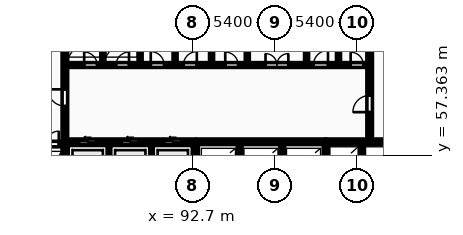
"""IFC4 building model, lengths in metres.
Left out: names, types, materials, properties, quantities, classifications, styles, units other than length and angle.
Written with IfcOpenShell. Run it as: python <this file> out.ifc"""

import sys

from ifc_helpers import new_model, si_unit, direction, frame, frame_2d, origin, place, context, subcontext, project, spatial, rectangle, extrude, element, fill, save


model = new_model("IFC4")
c1 = context("Model", 3, precision=1e-05, world=origin(), true_north=direction((0.0, 1.0)))
c2 = subcontext(c1, "Body", "Model", "MODEL_VIEW")
j1 = project(units=[si_unit("LENGTHUNIT", "METRE"), si_unit("PLANEANGLEUNIT", "RADIAN")], contexts=[c1])
p1 = place(None, origin())
s1 = spatial("IfcSite", under=j1, at=p1, CompositionType="ELEMENT")
p2 = place(p1, origin())
s2 = spatial("IfcBuilding", under=s1, at=p2, CompositionType="ELEMENT")
p3 = place(p2, frame((0.0, 0.0, -7.2)))
s3 = spatial("IfcBuildingStorey", under=s2, at=p3, CompositionType="ELEMENT", Elevation=-7.2)
p4 = place(p3, frame((79.79, 58.1, 0.0), z_axis=(0.0, 0.0, 1.0), x_axis=(1.0, 0.0, 0.0)))
e1 = element("IfcWall", 1, at=p4, inside=s3, PredefinedType="SHEAR", context=c2, shape_type="SweptSolid", body=[
    extrude(rectangle(XDim=4.39, YDim=0.25, at=frame_2d((2.195, 0.0))), origin(), (0.0, 0.0, 1.0), 3.6),
])
p5 = place(p4, frame((1.05, 0.0, 0.0)))
e2 = element("IfcOpeningElement", 2, at=p5, cuts=e1, PredefinedType="OPENING", context=c2, shape_type="SweptSolid", body=[
    extrude(rectangle(XDim=1.12, YDim=2.12, at=frame_2d((0.56, 1.06))), frame((0.0, 0.135, 0.0), z_axis=(0.0, -1.0, 0.0), x_axis=(1.0, 0.0, 0.0)), (0.0, 0.0, 1.0), 0.27),
])
p6 = place(p4, frame((3.26, 0.0, 0.0)))
e3 = element("IfcOpeningElement", 3, at=p6, cuts=e1, PredefinedType="OPENING", context=c2, shape_type="SweptSolid", body=[
    extrude(rectangle(XDim=0.85, YDim=2.05, at=frame_2d((0.425, 1.025))), frame((0.0, 0.135, 0.0), z_axis=(0.0, -1.0, 0.0), x_axis=(1.0, 0.0, 0.0)), (0.0, 0.0, 1.0), 0.27),
])
p7 = place(p3, frame((84.3, 55.4, 0.0), z_axis=(0.0, 0.0, 1.0), x_axis=(0.0, 1.0, 0.0)))
e4 = element("IfcWall", 4, at=p7, inside=s3, PredefinedType="SHEAR", context=c2, shape_type="SweptSolid", body=[
    extrude(rectangle(XDim=11.6, YDim=0.25, at=frame_2d((5.8, 0.0))), origin(), (0.0, 0.0, 1.0), 3.6),
])
p8 = place(p7, frame((5.2, 0.0, 0.0)))
e5 = element("IfcOpeningElement", 5, at=p8, cuts=e4, PredefinedType="OPENING", context=c2, shape_type="SweptSolid", body=[
    extrude(rectangle(XDim=1.1, YDim=2.1, at=frame_2d((0.55, 1.05))), frame((0.0, 0.135, 0.0), z_axis=(0.0, -1.0, 0.0), x_axis=(1.0, 0.0, 0.0)), (0.0, 0.0, 1.0), 0.27),
])
for number, where, z_axis, x_axis in (
    (6, (87.2, 55.4, 0.0), (0.0, 0.0, 1.0), (0.0, 1.0, 0.0)),
    (7, (90.0, 55.4, 0.0), (0.0, 0.0, 1.0), (0.0, 1.0, 0.0)),
):
    element("IfcWall", number, at=place(p3, frame(where, z_axis=z_axis, x_axis=x_axis)), inside=s3, PredefinedType="PARTITIONING", context=c2, shape_type="SweptSolid", body=[
        extrude(rectangle(XDim=2.72, YDim=0.2, at=frame_2d((1.36, 0.0))), origin(), (0.0, 0.0, 1.0), 3.3),
    ])
p9 = place(p3, frame((84.42, 58.25, 0.0), z_axis=(0.0, 0.0, 1.0), x_axis=(1.0, 0.0, 0.0)))
e8 = element("IfcWall", 8, at=p9, inside=s3, PredefinedType="SHEAR", context=c2, shape_type="SweptSolid", body=[
    extrude(rectangle(XDim=8.36, YDim=0.25, at=frame_2d((4.18, 0.0))), origin(), (0.0, 0.0, 1.0), 3.6),
])
p10 = place(p9, frame((0.82, 0.0, 0.0)))
e9 = element("IfcOpeningElement", 9, at=p10, cuts=e8, PredefinedType="OPENING", context=c2, shape_type="SweptSolid", body=[
    extrude(rectangle(XDim=1.12, YDim=2.12, at=frame_2d((0.56, 1.06))), frame((0.0, 0.135, 0.0), z_axis=(0.0, -1.0, 0.0), x_axis=(1.0, 0.0, 0.0)), (0.0, 0.0, 1.0), 0.27),
])
p11 = place(p9, frame((3.62, 0.0, 0.0)))
e10 = element("IfcOpeningElement", 10, at=p11, cuts=e8, PredefinedType="OPENING", context=c2, shape_type="SweptSolid", body=[
    extrude(rectangle(XDim=1.12, YDim=2.12, at=frame_2d((0.56, 1.06))), frame((0.0, 0.135, 0.0), z_axis=(0.0, -1.0, 0.0), x_axis=(1.0, 0.0, 0.0)), (0.0, 0.0, 1.0), 0.27),
])
p12 = place(p9, frame((6.42, 0.0, 0.0)))
e11 = element("IfcOpeningElement", 11, at=p12, cuts=e8, PredefinedType="OPENING", context=c2, shape_type="SweptSolid", body=[
    extrude(rectangle(XDim=1.12, YDim=2.12, at=frame_2d((0.56, 1.06))), frame((0.0, 0.135, 0.0), z_axis=(0.0, -1.0, 0.0), x_axis=(1.0, 0.0, 0.0)), (0.0, 0.0, 1.0), 0.27),
])
p13 = place(p3, frame((92.9, 55.4, 0.0), z_axis=(0.0, 0.0, 1.0), x_axis=(0.0, 1.0, 0.0)))
e12 = element("IfcWall", 12, at=p13, inside=s3, PredefinedType="SHEAR", context=c2, shape_type="SweptSolid", body=[
    extrude(rectangle(XDim=2.85, YDim=0.25, at=frame_2d((1.425, 0.0))), origin(), (0.0, 0.0, 1.0), 3.6),
])
for number, where, z_axis, x_axis in (
    (13, (95.8, 55.4, 0.0), (0.0, 0.0, 1.0), (0.0, 1.0, 0.0)),
    (14, (98.6, 55.4, 0.0), (0.0, 0.0, 1.0), (0.0, 1.0, 0.0)),
):
    element("IfcWall", number, at=place(p3, frame(where, z_axis=z_axis, x_axis=x_axis)), inside=s3, PredefinedType="PARTITIONING", context=c2, shape_type="SweptSolid", body=[
        extrude(rectangle(XDim=2.72, YDim=0.2, at=frame_2d((1.36, 0.0))), origin(), (0.0, 0.0, 1.0), 3.3),
    ])
p14 = place(p3, frame((93.02, 58.25, 0.0), z_axis=(0.0, 0.0, 1.0), x_axis=(1.0, 0.0, 0.0)))
e15 = element("IfcWall", 15, at=p14, inside=s3, PredefinedType="SHEAR", context=c2, shape_type="SweptSolid", body=[
    extrude(rectangle(XDim=8.36, YDim=0.25, at=frame_2d((4.18, 0.0))), origin(), (0.0, 0.0, 1.0), 3.6),
])
p15 = place(p3, frame((101.48, 55.4, 0.0), z_axis=(0.0, 0.0, 1.0), x_axis=(0.0, 1.0, 0.0)))
e16 = element("IfcWall", 16, at=p15, inside=s3, PredefinedType="SHEAR", context=c2, shape_type="SweptSolid", body=[
    extrude(rectangle(XDim=2.85, YDim=0.25, at=frame_2d((1.425, 0.0))), origin(), (0.0, 0.0, 1.0), 3.6),
])
p16 = place(p3, frame((103.85, 55.4, 0.0), z_axis=(0.0, 0.0, 1.0), x_axis=(0.0, 1.0, 0.0)))
e17 = element("IfcWall", 17, at=p16, inside=s3, PredefinedType="PARTITIONING", context=c2, shape_type="SweptSolid", body=[
    extrude(rectangle(XDim=2.72, YDim=0.2, at=frame_2d((1.36, 0.0))), origin(), (0.0, 0.0, 1.0), 3.3),
])
p17 = place(p3, frame((101.55, 58.25, 0.0), z_axis=(0.0, 0.0, 1.0), x_axis=(1.0, 0.0, 0.0)))
e18 = element("IfcWall", 18, at=p17, inside=s3, PredefinedType="SHEAR", context=c2, shape_type="SweptSolid", body=[
    extrude(rectangle(XDim=4.6, YDim=0.25, at=frame_2d((2.3, 0.0))), origin(), (0.0, 0.0, 1.0), 3.6),
])
for number, where, z_axis, x_axis in (
    (19, (86.8, 63.4, 0.0), (0.0, 0.0, 1.0), (0.0, 1.0, 0.0)),
    (20, (89.25, 63.4, 0.0), (0.0, 0.0, 1.0), (0.0, 1.0, 0.0)),
    (21, (91.55, 63.4, 0.0), (0.0, 0.0, 1.0), (0.0, 1.0, 0.0)),
):
    element("IfcWall", number, at=place(p3, frame(where, z_axis=z_axis, x_axis=x_axis)), inside=s3, PredefinedType="PARTITIONING", context=c2, shape_type="SweptSolid", body=[
        extrude(rectangle(XDim=3.6, YDim=0.15, at=frame_2d((1.8, 0.0))), origin(), (0.0, 0.0, 1.0), 3.3),
    ])
p18 = place(p3, frame((93.95, 63.4, 0.0), z_axis=(0.0, 0.0, 1.0), x_axis=(0.0, 1.0, 0.0)))
e22 = element("IfcWall", 22, at=p18, inside=s3, PredefinedType="PARTITIONING", context=c2, shape_type="SweptSolid", body=[
    extrude(rectangle(XDim=3.6, YDim=0.15, at=frame_2d((1.8, 0.0))), origin(), (0.0, 0.0, 1.0), 2.55),
])
for number, where, z_axis, x_axis in (
    (23, (102.3, 63.4, 0.0), (0.0, 0.0, 1.0), (0.0, 1.0, 0.0)),
    (24, (96.3, 63.4, 0.0), (0.0, 0.0, 1.0), (0.0, 1.0, 0.0)),
    (25, (100.2, 63.4, 0.0), (0.0, 0.0, 1.0), (0.0, 1.0, 0.0)),
):
    element("IfcWall", number, at=place(p3, frame(where, z_axis=z_axis, x_axis=x_axis)), inside=s3, PredefinedType="PARTITIONING", context=c2, shape_type="SweptSolid", body=[
        extrude(rectangle(XDim=3.6, YDim=0.15, at=frame_2d((1.8, 0.0))), origin(), (0.0, 0.0, 1.0), 3.3),
    ])
p19 = place(p3, frame((84.42, 63.3, 0.0), z_axis=(0.0, 0.0, 1.0), x_axis=(1.0, 0.0, 0.0)))
e26 = element("IfcWall", 26, at=p19, inside=s3, PredefinedType="PARTITIONING", context=c2, shape_type="SweptSolid", body=[
    extrude(rectangle(XDim=19.83, YDim=0.2, at=frame_2d((9.915, 0.0))), origin(), (0.0, 0.0, 1.0), 3.3),
])
p20 = place(p19, frame((1.15, 0.0, 0.0)))
e27 = element("IfcOpeningElement", 27, at=p20, cuts=e26, PredefinedType="OPENING", context=c2, shape_type="SweptSolid", body=[
    extrude(rectangle(XDim=0.85, YDim=2.05, at=frame_2d((0.425, 1.025))), frame((0.0, 0.11, 0.0), z_axis=(0.0, -1.0, 0.0), x_axis=(1.0, 0.0, 0.0)), (0.0, 0.0, 1.0), 0.22),
])
p21 = place(p19, frame((3.25, 0.0, 0.0)))
e28 = element("IfcOpeningElement", 28, at=p21, cuts=e26, PredefinedType="OPENING", context=c2, shape_type="SweptSolid", body=[
    extrude(rectangle(XDim=0.85, YDim=2.05, at=frame_2d((0.425, 1.025))), frame((0.0, 0.11, 0.0), z_axis=(0.0, -1.0, 0.0), x_axis=(1.0, 0.0, 0.0)), (0.0, 0.0, 1.0), 0.22),
])
p22 = place(p19, frame((13.08, 0.0, 0.0)))
e29 = element("IfcOpeningElement", 29, at=p22, cuts=e26, PredefinedType="OPENING", context=c2, shape_type="SweptSolid", body=[
    extrude(rectangle(XDim=1.5, YDim=2.2, at=frame_2d((0.75, 1.1))), frame((0.0, 0.11, 0.0), z_axis=(0.0, -1.0, 0.0), x_axis=(1.0, 0.0, 0.0)), (0.0, 0.0, 1.0), 0.22),
])
p23 = place(p19, frame((5.53, 0.0, 0.0)))
e30 = element("IfcOpeningElement", 30, at=p23, cuts=e26, PredefinedType="OPENING", context=c2, shape_type="SweptSolid", body=[
    extrude(rectangle(XDim=0.88, YDim=2.06, at=frame_2d((0.44, 1.03))), frame((0.0, 0.11, 0.0), z_axis=(0.0, -1.0, 0.0), x_axis=(1.0, 0.0, 0.0)), (0.0, 0.0, 1.0), 0.22),
])
p24 = place(p19, frame((7.68, 0.0, 0.0)))
e31 = element("IfcOpeningElement", 31, at=p24, cuts=e26, PredefinedType="OPENING", context=c2, shape_type="SweptSolid", body=[
    extrude(rectangle(XDim=0.88, YDim=2.06, at=frame_2d((0.44, 1.03))), frame((0.0, 0.11, 0.0), z_axis=(0.0, -1.0, 0.0), x_axis=(1.0, 0.0, 0.0)), (0.0, 0.0, 1.0), 0.22),
])
p25 = place(p19, frame((10.43, 0.0, 0.0)))
e32 = element("IfcOpeningElement", 32, at=p25, cuts=e26, PredefinedType="OPENING", context=c2, shape_type="SweptSolid", body=[
    extrude(rectangle(XDim=0.85, YDim=2.05, at=frame_2d((0.425, 1.025))), frame((0.0, 0.11, 0.0), z_axis=(0.0, -1.0, 0.0), x_axis=(1.0, 0.0, 0.0)), (0.0, 0.0, 1.0), 0.22),
])
p26 = place(p19, frame((16.23, 0.0, 0.0)))
e33 = element("IfcOpeningElement", 33, at=p26, cuts=e26, PredefinedType="OPENING", context=c2, shape_type="SweptSolid", body=[
    extrude(rectangle(XDim=0.96, YDim=2.1, at=frame_2d((0.48, 1.05))), frame((0.0, 0.11, 0.0), z_axis=(0.0, -1.0, 0.0), x_axis=(1.0, 0.0, 0.0)), (0.0, 0.0, 1.0), 0.22),
])
p27 = place(p19, frame((18.68, 0.0, 0.0)))
e34 = element("IfcOpeningElement", 34, at=p27, cuts=e26, PredefinedType="OPENING", context=c2, shape_type="SweptSolid", body=[
    extrude(rectangle(XDim=0.84, YDim=2.04, at=frame_2d((0.42, 1.02))), frame((0.0, 0.11, 0.0), z_axis=(0.0, -1.0, 0.0), x_axis=(1.0, 0.0, 0.0)), (0.0, 0.0, 1.0), 0.22),
])
p28 = place(p3, frame((104.35, 58.4, 0.0), z_axis=(0.0, 0.0, 1.0), x_axis=(0.0, 1.0, 0.0)))
e35 = element("IfcWall", 35, at=p28, inside=s3, PredefinedType="SHEAR", context=c2, shape_type="SweptSolid", body=[
    extrude(rectangle(XDim=8.6, YDim=0.25, at=frame_2d((4.3, 0.0))), origin(), (0.0, 0.0, 1.0), 3.6),
])
p29 = place(p28, frame((1.8, 0.0, 0.0)))
e36 = element("IfcOpeningElement", 36, at=p29, cuts=e35, PredefinedType="OPENING", context=c2, shape_type="SweptSolid", body=[
    extrude(rectangle(XDim=1.1, YDim=2.1, at=frame_2d((0.55, 1.05))), frame((0.0, 0.135, 0.0), z_axis=(0.0, -1.0, 0.0), x_axis=(1.0, 0.0, 0.0)), (0.0, 0.0, 1.0), 0.27),
])
p30 = place(p6, origin())
e37 = element("IfcDoor", 37, at=p30, inside=s3, OperationType="SINGLE_SWING_RIGHT", PredefinedType="DOOR", context=c2, shape_type="SweptSolid", body=[
    extrude(rectangle(XDim=0.85, YDim=2.05, at=frame_2d((0.425, 1.025))), frame((0.0, 0.025, 0.0), z_axis=(0.0, -1.0, 0.0), x_axis=(1.0, 0.0, 0.0)), (0.0, 0.0, 1.0), 0.05),
])
fill(e3, e37)
p31 = place(p8, origin())
e38 = element("IfcDoor", 38, at=p31, inside=s3, OperationType="SINGLE_SWING_RIGHT", PredefinedType="DOOR", context=c2, shape_type="SweptSolid", body=[
    extrude(rectangle(XDim=1.1, YDim=2.1, at=frame_2d((0.55, 1.05))), frame((0.0, 0.025, 0.0), z_axis=(0.0, -1.0, 0.0), x_axis=(1.0, 0.0, 0.0)), (0.0, 0.0, 1.0), 0.05),
])
fill(e5, e38)
p32 = place(p10, origin())
e39 = element("IfcDoor", 39, at=p32, inside=s3, OperationType="SLIDING_TO_LEFT", PredefinedType="DOOR", context=c2, shape_type="SweptSolid", body=[
    extrude(rectangle(XDim=1.12, YDim=2.12, at=frame_2d((0.56, 1.06))), frame((0.0, 0.025, 0.0), z_axis=(0.0, -1.0, 0.0), x_axis=(1.0, 0.0, 0.0)), (0.0, 0.0, 1.0), 0.05),
])
fill(e9, e39)
p33 = place(p11, origin())
e40 = element("IfcDoor", 40, at=p33, inside=s3, OperationType="SLIDING_TO_LEFT", PredefinedType="DOOR", context=c2, shape_type="SweptSolid", body=[
    extrude(rectangle(XDim=1.12, YDim=2.12, at=frame_2d((0.56, 1.06))), frame((0.0, 0.025, 0.0), z_axis=(0.0, -1.0, 0.0), x_axis=(1.0, 0.0, 0.0)), (0.0, 0.0, 1.0), 0.05),
])
fill(e10, e40)
p34 = place(p12, origin())
e41 = element("IfcDoor", 41, at=p34, inside=s3, OperationType="SLIDING_TO_LEFT", PredefinedType="DOOR", context=c2, shape_type="SweptSolid", body=[
    extrude(rectangle(XDim=1.12, YDim=2.12, at=frame_2d((0.56, 1.06))), frame((0.0, 0.025, 0.0), z_axis=(0.0, -1.0, 0.0), x_axis=(1.0, 0.0, 0.0)), (0.0, 0.0, 1.0), 0.05),
])
fill(e11, e41)
p35 = place(p20, origin())
e42 = element("IfcDoor", 42, at=p35, inside=s3, OperationType="SINGLE_SWING_LEFT", PredefinedType="DOOR", context=c2, shape_type="SweptSolid", body=[
    extrude(rectangle(XDim=0.85, YDim=2.05, at=frame_2d((0.425, 1.025))), frame((0.0, 0.025, 0.0), z_axis=(0.0, -1.0, 0.0), x_axis=(1.0, 0.0, 0.0)), (0.0, 0.0, 1.0), 0.05),
])
fill(e27, e42)
p36 = place(p21, origin())
e43 = element("IfcDoor", 43, at=p36, inside=s3, OperationType="SINGLE_SWING_RIGHT", PredefinedType="DOOR", context=c2, shape_type="SweptSolid", body=[
    extrude(rectangle(XDim=0.85, YDim=2.05, at=frame_2d((0.425, 1.025))), frame((0.0, 0.025, 0.0), z_axis=(0.0, -1.0, 0.0), x_axis=(1.0, 0.0, 0.0)), (0.0, 0.0, 1.0), 0.05),
])
fill(e28, e43)
p37 = place(p22, origin())
e44 = element("IfcDoor", 44, at=p37, inside=s3, OperationType="DOUBLE_DOOR_SINGLE_SWING", PredefinedType="DOOR", context=c2, shape_type="SweptSolid", body=[
    extrude(rectangle(XDim=1.5, YDim=2.2, at=frame_2d((0.75, 1.1))), frame((0.0, 0.025, 0.0), z_axis=(0.0, -1.0, 0.0), x_axis=(1.0, 0.0, 0.0)), (0.0, 0.0, 1.0), 0.05),
])
fill(e29, e44)
p38 = place(p23, origin())
e45 = element("IfcDoor", 45, at=p38, inside=s3, OperationType="SINGLE_SWING_LEFT", PredefinedType="DOOR", context=c2, shape_type="SweptSolid", body=[
    extrude(rectangle(XDim=0.88, YDim=2.06, at=frame_2d((0.44, 1.03))), frame((0.0, 0.025, 0.0), z_axis=(0.0, -1.0, 0.0), x_axis=(1.0, 0.0, 0.0)), (0.0, 0.0, 1.0), 0.05),
])
fill(e30, e45)
p39 = place(p24, origin())
e46 = element("IfcDoor", 46, at=p39, inside=s3, OperationType="SINGLE_SWING_RIGHT", PredefinedType="DOOR", context=c2, shape_type="SweptSolid", body=[
    extrude(rectangle(XDim=0.88, YDim=2.06, at=frame_2d((0.44, 1.03))), frame((0.0, 0.025, 0.0), z_axis=(0.0, -1.0, 0.0), x_axis=(1.0, 0.0, 0.0)), (0.0, 0.0, 1.0), 0.05),
])
fill(e31, e46)
p40 = place(p25, origin())
e47 = element("IfcDoor", 47, at=p40, inside=s3, OperationType="SINGLE_SWING_LEFT", PredefinedType="DOOR", context=c2, shape_type="SweptSolid", body=[
    extrude(rectangle(XDim=0.85, YDim=2.05, at=frame_2d((0.425, 1.025))), frame((0.0, 0.025, 0.0), z_axis=(0.0, -1.0, 0.0), x_axis=(1.0, 0.0, 0.0)), (0.0, 0.0, 1.0), 0.05),
])
fill(e32, e47)
p41 = place(p26, origin())
e48 = element("IfcDoor", 48, at=p41, inside=s3, OperationType="SINGLE_SWING_RIGHT", PredefinedType="DOOR", context=c2, shape_type="SweptSolid", body=[
    extrude(rectangle(XDim=0.96, YDim=2.1, at=frame_2d((0.48, 1.05))), frame((0.0, 0.025, 0.0), z_axis=(0.0, -1.0, 0.0), x_axis=(1.0, 0.0, 0.0)), (0.0, 0.0, 1.0), 0.05),
])
fill(e33, e48)
p42 = place(p27, origin())
e49 = element("IfcDoor", 49, at=p42, inside=s3, OperationType="SINGLE_SWING_LEFT", PredefinedType="DOOR", context=c2, shape_type="SweptSolid", body=[
    extrude(rectangle(XDim=0.84, YDim=2.04, at=frame_2d((0.42, 1.02))), frame((0.0, 0.025, 0.0), z_axis=(0.0, -1.0, 0.0), x_axis=(1.0, 0.0, 0.0)), (0.0, 0.0, 1.0), 0.05),
])
fill(e34, e49)
p43 = place(p29, origin())
e50 = element("IfcDoor", 50, at=p43, inside=s3, OperationType="SINGLE_SWING_LEFT", PredefinedType="DOOR", context=c2, shape_type="SweptSolid", body=[
    extrude(rectangle(XDim=1.1, YDim=2.1, at=frame_2d((0.55, 1.05))), frame((0.0, 0.025, 0.0), z_axis=(0.0, -1.0, 0.0), x_axis=(1.0, 0.0, 0.0)), (0.0, 0.0, 1.0), 0.05),
])
fill(e36, e50)
save(model, sys.argv[1])
